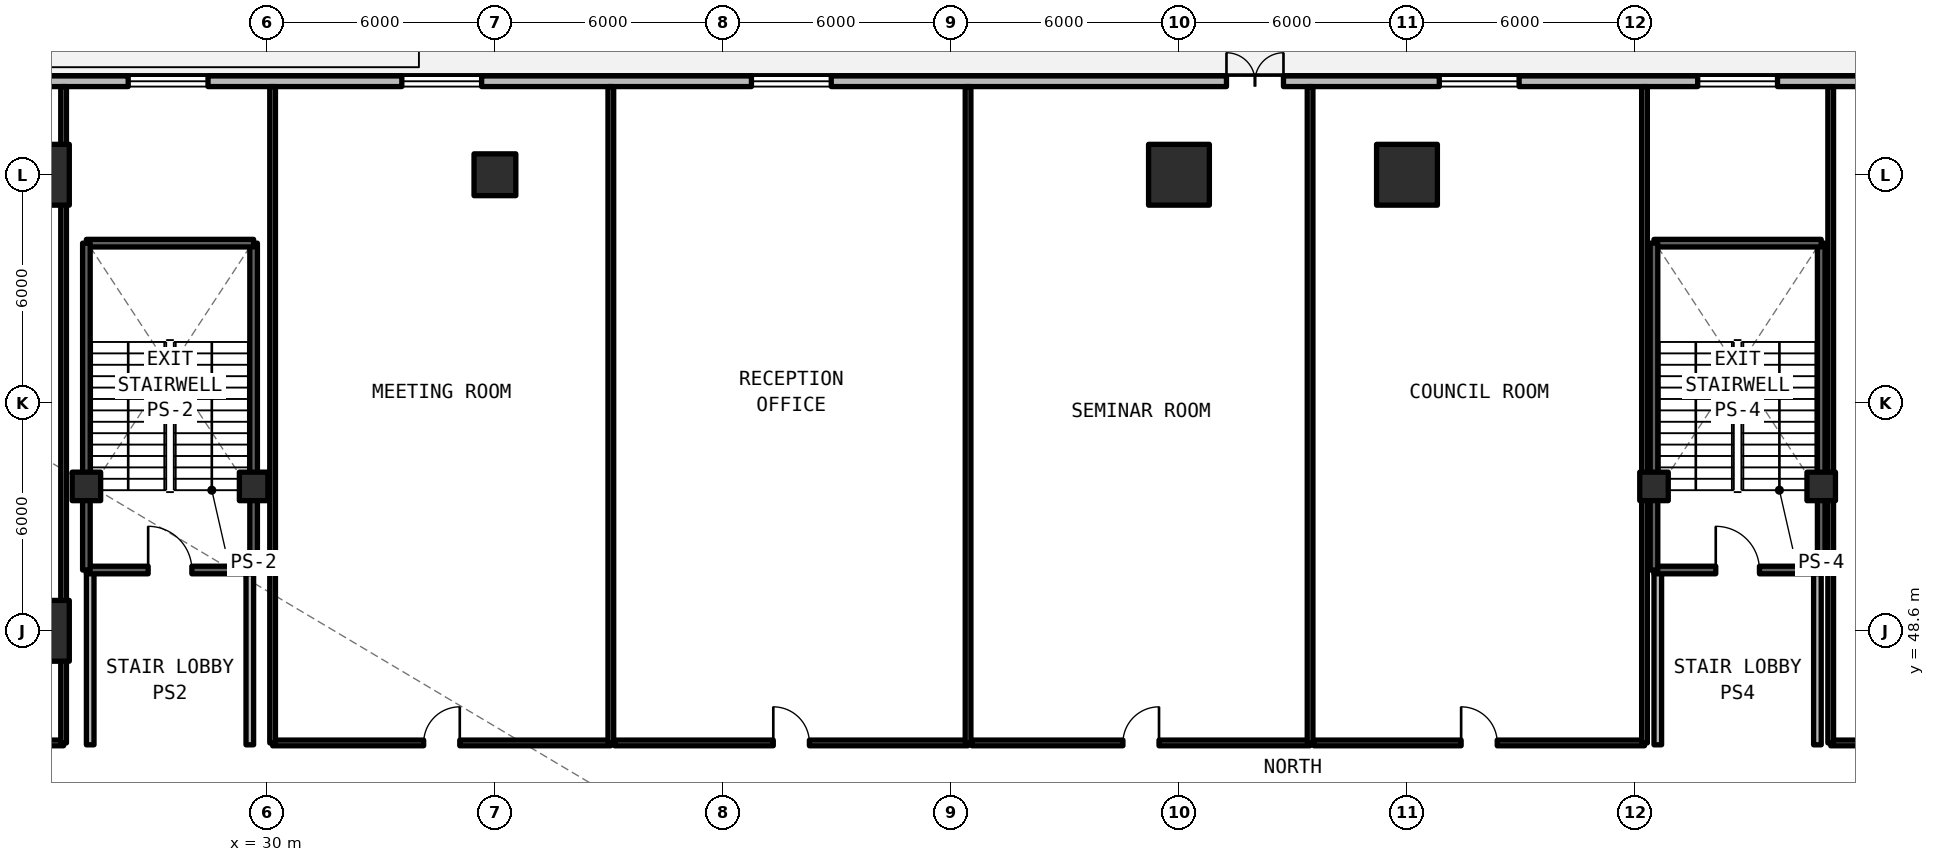
"""IFC4 building model, lengths in metres.
Left out: names, types, materials, properties, quantities, classifications, styles, units other than length and angle.
Written with IfcOpenShell. Run it as: python <this file> out.ifc"""

import sys

from ifc_helpers import new_model, si_unit, direction, frame, frame_2d, origin, origin_2d, place, context, subcontext, project, spatial, rectangle, circle, extrude, element, fill, save


model = new_model("IFC4")
c1 = context("Model", 3, precision=1e-05, world=origin(), true_north=direction((0.0, 1.0)))
c2 = subcontext(c1, "Body", "Model", "MODEL_VIEW")
j1 = project(units=[si_unit("LENGTHUNIT", "METRE"), si_unit("PLANEANGLEUNIT", "RADIAN")], contexts=[c1])
p1 = place(None, origin())
s1 = spatial("IfcSite", under=j1, at=p1, CompositionType="ELEMENT")
p2 = place(p1, origin())
s2 = spatial("IfcBuilding", under=s1, at=p2, CompositionType="ELEMENT")
p3 = place(p2, frame((0.0, 0.0, 19.47)))
s3 = spatial("IfcBuildingStorey", under=s2, at=p3, CompositionType="ELEMENT", Elevation=19.47)
p4 = place(p3, frame((24.0, 60.6, 0.0), z_axis=(0.0, 0.0, 1.0), x_axis=(1.0, 0.0, 0.0)))
e1 = element("IfcColumn", 1, at=p4, inside=s3, PredefinedType="COLUMN", context=c2, shape_type="SweptSolid", body=[
    extrude(rectangle(XDim=1.6, YDim=1.6, at=origin_2d()), origin(), (0.0, 0.0, 1.0), 4.62),
])
p5 = place(p3, frame((36.0, 60.6, 0.0), z_axis=(0.0, 0.0, 1.0), x_axis=(1.0, 0.0, 0.0)))
e2 = element("IfcColumn", 2, at=p5, inside=s3, PredefinedType="COLUMN", context=c2, shape_type="SweptSolid", body=[
    extrude(circle(Radius=0.55, at=origin_2d()), origin(), (0.0, 0.0, 1.0), 4.62),
])
for number, where, z_axis, x_axis in (
    (3, (54.0, 60.6, 0.0), (0.0, 0.0, 1.0), (1.0, 0.0, 0.0)),
    (4, (60.0, 60.6, 0.0), (0.0, 0.0, 1.0), (1.0, 0.0, 0.0)),
    (5, (24.0, 48.6, 0.0), (0.0, 0.0, 1.0), (1.0, 0.0, 0.0)),
):
    element("IfcColumn", number, at=place(p3, frame(where, z_axis=z_axis, x_axis=x_axis)), inside=s3, PredefinedType="COLUMN", context=c2, shape_type="SweptSolid", body=[
        extrude(rectangle(XDim=1.6, YDim=1.6, at=origin_2d()), origin(), (0.0, 0.0, 1.0), 4.62),
    ])
for number, where, z_axis, x_axis in (
    (6, (25.25, 52.4, 0.0), (0.0, 0.0, 1.0), (1.0, 0.0, 0.0)),
    (7, (29.65, 52.4, 0.0), (0.0, 0.0, 1.0), (1.0, 0.0, 0.0)),
    (8, (66.5, 52.4, 0.0), (0.0, 0.0, 1.0), (1.0, 0.0, 0.0)),
    (9, (70.9, 52.4, 0.0), (0.0, 0.0, 1.0), (1.0, 0.0, 0.0)),
):
    element("IfcColumn", number, at=place(p3, frame(where, z_axis=z_axis, x_axis=x_axis)), inside=s3, PredefinedType="COLUMN", context=c2, shape_type="SweptSolid", body=[
        extrude(rectangle(XDim=0.75, YDim=0.75, at=origin_2d()), origin(), (0.0, 0.0, 1.0), 4.27),
    ])
p6 = place(p3, frame((104.642, 63.06, 0.0), z_axis=(0.0, 0.0, 1.0), x_axis=(-1.0, 0.0, 0.0)))
e10 = element("IfcWall", 10, at=p6, inside=s3, PredefinedType="SOLIDWALL", context=c2, shape_type="SweptSolid", body=[
    extrude(rectangle(XDim=95.284, YDim=0.28, at=frame_2d((47.642, 0.0))), origin(), (0.0, 0.0, 1.0), 4.27),
])
p7 = place(p6, frame((47.892, 0.0, 0.0)))
e11 = element("IfcOpeningElement", 11, at=p7, cuts=e10, PredefinedType="OPENING", context=c2, shape_type="SweptSolid", body=[
    extrude(rectangle(XDim=1.5, YDim=2.2, at=frame_2d((0.75, 1.1))), frame((0.0, 0.15, 0.0), z_axis=(0.0, -1.0, 0.0), x_axis=(1.0, 0.0, 0.0)), (0.0, 0.0, 1.0), 0.3),
])
p8 = place(p6, frame((86.192, 0.0, 0.78)))
e12 = element("IfcOpeningElement", 12, at=p8, cuts=e10, PredefinedType="OPENING", context=c2, shape_type="SweptSolid", body=[
    extrude(rectangle(XDim=2.1, YDim=1.66, at=frame_2d((1.05, 0.83))), frame((0.0, 0.15, 0.0), z_axis=(0.0, -1.0, 0.0), x_axis=(1.0, 0.0, 0.0)), (0.0, 0.0, 1.0), 0.3),
])
p9 = place(p6, frame((68.992, 0.0, 0.78)))
e13 = element("IfcOpeningElement", 13, at=p9, cuts=e10, PredefinedType="OPENING", context=c2, shape_type="SweptSolid", body=[
    extrude(rectangle(XDim=2.1, YDim=1.66, at=frame_2d((1.05, 0.83))), frame((0.0, 0.15, 0.0), z_axis=(0.0, -1.0, 0.0), x_axis=(1.0, 0.0, 0.0)), (0.0, 0.0, 1.0), 0.3),
])
p10 = place(p6, frame((59.792, 0.0, 0.78)))
e14 = element("IfcOpeningElement", 14, at=p10, cuts=e10, PredefinedType="OPENING", context=c2, shape_type="SweptSolid", body=[
    extrude(rectangle(XDim=2.1, YDim=1.66, at=frame_2d((1.05, 0.83))), frame((0.0, 0.15, 0.0), z_axis=(0.0, -1.0, 0.0), x_axis=(1.0, 0.0, 0.0)), (0.0, 0.0, 1.0), 0.3),
])
p11 = place(p6, frame((41.692, 0.0, 0.78)))
e15 = element("IfcOpeningElement", 15, at=p11, cuts=e10, PredefinedType="OPENING", context=c2, shape_type="SweptSolid", body=[
    extrude(rectangle(XDim=2.1, YDim=1.66, at=frame_2d((1.05, 0.83))), frame((0.0, 0.15, 0.0), z_axis=(0.0, -1.0, 0.0), x_axis=(1.0, 0.0, 0.0)), (0.0, 0.0, 1.0), 0.3),
])
p12 = place(p6, frame((25.992, 0.0, 0.78)))
e16 = element("IfcOpeningElement", 16, at=p12, cuts=e10, PredefinedType="OPENING", context=c2, shape_type="SweptSolid", body=[
    extrude(rectangle(XDim=2.1, YDim=1.66, at=frame_2d((1.05, 0.83))), frame((0.0, 0.15, 0.0), z_axis=(0.0, -1.0, 0.0), x_axis=(1.0, 0.0, 0.0)), (0.0, 0.0, 1.0), 0.3),
])
p13 = place(p6, frame((7.192, 0.0, 0.78)))
e17 = element("IfcOpeningElement", 17, at=p13, cuts=e10, PredefinedType="OPENING", context=c2, shape_type="SweptSolid", body=[
    extrude(rectangle(XDim=2.1, YDim=1.66, at=frame_2d((1.05, 0.83))), frame((0.0, 0.15, 0.0), z_axis=(0.0, -1.0, 0.0), x_axis=(1.0, 0.0, 0.0)), (0.0, 0.0, 1.0), 0.3),
])
p14 = place(p6, frame((34.892, 0.0, 0.78)))
e18 = element("IfcOpeningElement", 18, at=p14, cuts=e10, PredefinedType="OPENING", context=c2, shape_type="SweptSolid", body=[
    extrude(rectangle(XDim=2.1, YDim=1.66, at=frame_2d((1.05, 0.83))), frame((0.0, 0.15, 0.0), z_axis=(0.0, -1.0, 0.0), x_axis=(1.0, 0.0, 0.0)), (0.0, 0.0, 1.0), 0.3),
])
p15 = place(p6, frame((76.192, 0.0, 0.78)))
e19 = element("IfcOpeningElement", 19, at=p15, cuts=e10, PredefinedType="OPENING", context=c2, shape_type="SweptSolid", body=[
    extrude(rectangle(XDim=2.1, YDim=1.66, at=frame_2d((1.05, 0.83))), frame((0.0, 0.15, 0.0), z_axis=(0.0, -1.0, 0.0), x_axis=(1.0, 0.0, 0.0)), (0.0, 0.0, 1.0), 0.3),
])
for number, where, z_axis, x_axis in (
    (20, (25.35, 45.6, 0.0), (0.0, 0.0, 1.0), (0.0, 1.0, 0.0)),
    (21, (29.55, 45.6, 0.0), (0.0, 0.0, 1.0), (0.0, 1.0, 0.0)),
    (22, (66.6, 45.6, 0.0), (0.0, 0.0, 1.0), (0.0, 1.0, 0.0)),
    (23, (70.8, 45.6, 0.0), (0.0, 0.0, 1.0), (0.0, 1.0, 0.0)),
):
    element("IfcWall", number, at=place(p3, frame(where, z_axis=z_axis, x_axis=x_axis)), inside=s3, PredefinedType="SOLIDWALL", context=c2, shape_type="SweptSolid", body=[
        extrude(rectangle(XDim=4.6, YDim=0.2, at=frame_2d((2.3, 0.0))), origin(), (0.0, 0.0, 1.0), 3.49),
    ])
p16 = place(p3, frame((10.15, 45.65, 0.0), z_axis=(0.0, 0.0, 1.0), x_axis=(1.0, 0.0, 0.0)))
e24 = element("IfcWall", 24, at=p16, inside=s3, PredefinedType="SOLIDWALL", context=c2, shape_type="SweptSolid", body=[
    extrude(rectangle(XDim=14.5, YDim=0.15, at=frame_2d((7.25, 0.0))), origin(), (0.0, 0.0, 1.0), 3.49),
])
p17 = place(p16, frame((6.775, 0.0, 0.0)))
e25 = element("IfcOpeningElement", 25, at=p17, cuts=e24, PredefinedType="OPENING", context=c2, shape_type="SweptSolid", body=[
    extrude(rectangle(XDim=0.95, YDim=2.15, at=frame_2d((0.475, 1.075))), frame((0.0, 0.085, 0.0), z_axis=(0.0, -1.0, 0.0), x_axis=(1.0, 0.0, 0.0)), (0.0, 0.0, 1.0), 0.17),
])
p18 = place(p3, frame((24.65, 45.65, 0.0), z_axis=(0.0, 0.0, 1.0), x_axis=(0.0, 1.0, 0.0)))
e26 = element("IfcWall", 26, at=p18, inside=s3, PredefinedType="SOLIDWALL", context=c2, shape_type="SweptSolid", body=[
    extrude(rectangle(XDim=17.27, YDim=0.15, at=frame_2d((8.635, 0.0))), origin(), (0.0, 0.0, 1.0), 3.49),
])
p19 = place(p3, frame((30.15, 45.65, 0.0), z_axis=(0.0, 0.0, 1.0), x_axis=(1.0, 0.0, 0.0)))
e27 = element("IfcWall", 27, at=p19, inside=s3, PredefinedType="SOLIDWALL", context=c2, shape_type="SweptSolid", body=[
    extrude(rectangle(XDim=8.9, YDim=0.15, at=frame_2d((4.45, 0.0))), origin(), (0.0, 0.0, 1.0), 3.49),
])
p20 = place(p19, frame((3.975, 0.0, 0.0)))
e28 = element("IfcOpeningElement", 28, at=p20, cuts=e27, PredefinedType="OPENING", context=c2, shape_type="SweptSolid", body=[
    extrude(rectangle(XDim=0.95, YDim=2.15, at=frame_2d((0.475, 1.075))), frame((0.0, 0.085, 0.0), z_axis=(0.0, -1.0, 0.0), x_axis=(1.0, 0.0, 0.0)), (0.0, 0.0, 1.0), 0.17),
])
for number, where, z_axis, x_axis in (
    (29, (30.15, 45.65, 0.0), (0.0, 0.0, 1.0), (0.0, 1.0, 0.0)),
    (30, (39.05, 45.65, 0.0), (0.0, 0.0, 1.0), (0.0, 1.0, 0.0)),
):
    element("IfcWall", number, at=place(p3, frame(where, z_axis=z_axis, x_axis=x_axis)), inside=s3, PredefinedType="SOLIDWALL", context=c2, shape_type="SweptSolid", body=[
        extrude(rectangle(XDim=17.27, YDim=0.15, at=frame_2d((8.635, 0.0))), origin(), (0.0, 0.0, 1.0), 3.49),
    ])
p21 = place(p3, frame((39.15, 45.65, 0.0), z_axis=(0.0, 0.0, 1.0), x_axis=(1.0, 0.0, 0.0)))
e31 = element("IfcWall", 31, at=p21, inside=s3, PredefinedType="SOLIDWALL", context=c2, shape_type="SweptSolid", body=[
    extrude(rectangle(XDim=9.3, YDim=0.15, at=frame_2d((4.65, 0.0))), origin(), (0.0, 0.0, 1.0), 3.49),
])
p22 = place(p21, frame((4.175, 0.0, 0.0)))
e32 = element("IfcOpeningElement", 32, at=p22, cuts=e31, PredefinedType="OPENING", context=c2, shape_type="SweptSolid", body=[
    extrude(rectangle(XDim=0.95, YDim=2.15, at=frame_2d((0.475, 1.075))), frame((0.0, 0.085, 0.0), z_axis=(0.0, -1.0, 0.0), x_axis=(1.0, 0.0, 0.0)), (0.0, 0.0, 1.0), 0.17),
])
p23 = place(p3, frame((48.45, 45.65, 0.0), z_axis=(0.0, 0.0, 1.0), x_axis=(0.0, 1.0, 0.0)))
e33 = element("IfcWall", 33, at=p23, inside=s3, PredefinedType="SOLIDWALL", context=c2, shape_type="SweptSolid", body=[
    extrude(rectangle(XDim=17.27, YDim=0.15, at=frame_2d((8.635, 0.0))), origin(), (0.0, 0.0, 1.0), 3.49),
])
p24 = place(p3, frame((48.55, 45.65, 0.0), z_axis=(0.0, 0.0, 1.0), x_axis=(1.0, 0.0, 0.0)))
e34 = element("IfcWall", 34, at=p24, inside=s3, PredefinedType="SOLIDWALL", context=c2, shape_type="SweptSolid", body=[
    extrude(rectangle(XDim=8.9, YDim=0.15, at=frame_2d((4.45, 0.0))), origin(), (0.0, 0.0, 1.0), 3.49),
])
p25 = place(p24, frame((3.975, 0.0, 0.0)))
e35 = element("IfcOpeningElement", 35, at=p25, cuts=e34, PredefinedType="OPENING", context=c2, shape_type="SweptSolid", body=[
    extrude(rectangle(XDim=0.95, YDim=2.15, at=frame_2d((0.475, 1.075))), frame((0.0, 0.085, 0.0), z_axis=(0.0, -1.0, 0.0), x_axis=(1.0, 0.0, 0.0)), (0.0, 0.0, 1.0), 0.17),
])
p26 = place(p3, frame((57.45, 45.65, 0.0), z_axis=(0.0, 0.0, 1.0), x_axis=(0.0, 1.0, 0.0)))
e36 = element("IfcWall", 36, at=p26, inside=s3, PredefinedType="SOLIDWALL", context=c2, shape_type="SweptSolid", body=[
    extrude(rectangle(XDim=17.27, YDim=0.15, at=frame_2d((8.635, 0.0))), origin(), (0.0, 0.0, 1.0), 3.49),
])
p27 = place(p3, frame((57.55, 45.65, 0.0), z_axis=(0.0, 0.0, 1.0), x_axis=(1.0, 0.0, 0.0)))
e37 = element("IfcWall", 37, at=p27, inside=s3, PredefinedType="SOLIDWALL", context=c2, shape_type="SweptSolid", body=[
    extrude(rectangle(XDim=8.7, YDim=0.15, at=frame_2d((4.35, 0.0))), origin(), (0.0, 0.0, 1.0), 3.49),
])
p28 = place(p27, frame((3.875, 0.0, 0.0)))
e38 = element("IfcOpeningElement", 38, at=p28, cuts=e37, PredefinedType="OPENING", context=c2, shape_type="SweptSolid", body=[
    extrude(rectangle(XDim=0.95, YDim=2.15, at=frame_2d((0.475, 1.075))), frame((0.0, 0.085, 0.0), z_axis=(0.0, -1.0, 0.0), x_axis=(1.0, 0.0, 0.0)), (0.0, 0.0, 1.0), 0.17),
])
p29 = place(p3, frame((66.25, 45.65, 0.0), z_axis=(0.0, 0.0, 1.0), x_axis=(0.0, 1.0, 0.0)))
e39 = element("IfcWall", 39, at=p29, inside=s3, PredefinedType="SOLIDWALL", context=c2, shape_type="SweptSolid", body=[
    extrude(rectangle(XDim=17.27, YDim=0.15, at=frame_2d((8.635, 0.0))), origin(), (0.0, 0.0, 1.0), 3.49),
])
p30 = place(p3, frame((71.15, 45.65, 0.0), z_axis=(0.0, 0.0, 1.0), x_axis=(1.0, 0.0, 0.0)))
e40 = element("IfcWall", 40, at=p30, inside=s3, PredefinedType="SOLIDWALL", context=c2, shape_type="SweptSolid", body=[
    extrude(rectangle(XDim=12.9, YDim=0.15, at=frame_2d((6.45, 0.0))), origin(), (0.0, 0.0, 1.0), 3.49),
])
p31 = place(p30, frame((5.975, 0.0, 0.0)))
e41 = element("IfcOpeningElement", 41, at=p31, cuts=e40, PredefinedType="OPENING", context=c2, shape_type="SweptSolid", body=[
    extrude(rectangle(XDim=0.95, YDim=2.15, at=frame_2d((0.475, 1.075))), frame((0.0, 0.085, 0.0), z_axis=(0.0, -1.0, 0.0), x_axis=(1.0, 0.0, 0.0)), (0.0, 0.0, 1.0), 0.17),
])
p32 = place(p3, frame((71.15, 45.65, 0.0), z_axis=(0.0, 0.0, 1.0), x_axis=(0.0, 1.0, 0.0)))
e42 = element("IfcWall", 42, at=p32, inside=s3, PredefinedType="SOLIDWALL", context=c2, shape_type="SweptSolid", body=[
    extrude(rectangle(XDim=17.27, YDim=0.15, at=frame_2d((8.635, 0.0))), origin(), (0.0, 0.0, 1.0), 3.49),
])
p33 = place(p3, frame((25.25, 50.2, 0.0), z_axis=(0.0, 0.0, 1.0), x_axis=(1.0, 0.0, 0.0)))
e43 = element("IfcWall", 43, at=p33, inside=s3, PredefinedType="SOLIDWALL", context=c2, shape_type="SweptSolid", body=[
    extrude(rectangle(XDim=4.4, YDim=0.2, at=frame_2d((2.2, 0.0))), origin(), (0.0, 0.0, 1.0), 4.62),
])
p34 = place(p33, frame((1.625, 0.0, 0.0)))
e44 = element("IfcOpeningElement", 44, at=p34, cuts=e43, PredefinedType="OPENING", context=c2, shape_type="SweptSolid", body=[
    extrude(rectangle(XDim=1.15, YDim=2.15, at=frame_2d((0.575, 1.075))), frame((0.0, 0.11, 0.0), z_axis=(0.0, -1.0, 0.0), x_axis=(1.0, 0.0, 0.0)), (0.0, 0.0, 1.0), 0.22),
])
p35 = place(p3, frame((29.65, 50.2, 0.0), z_axis=(0.0, 0.0, 1.0), x_axis=(0.0, 1.0, 0.0)))
e45 = element("IfcWall", 45, at=p35, inside=s3, PredefinedType="SOLIDWALL", context=c2, shape_type="SweptSolid", body=[
    extrude(rectangle(XDim=8.6, YDim=0.2, at=frame_2d((4.3, 0.0))), origin(), (0.0, 0.0, 1.0), 4.62),
])
p36 = place(p3, frame((29.65, 58.8, 0.0), z_axis=(0.0, 0.0, 1.0), x_axis=(-1.0, 0.0, 0.0)))
e46 = element("IfcWall", 46, at=p36, inside=s3, PredefinedType="SOLIDWALL", context=c2, shape_type="SweptSolid", body=[
    extrude(rectangle(XDim=4.4, YDim=0.2, at=frame_2d((2.2, 0.0))), origin(), (0.0, 0.0, 1.0), 4.62),
])
p37 = place(p3, frame((25.25, 58.8, 0.0), z_axis=(0.0, 0.0, 1.0), x_axis=(0.0, -1.0, 0.0)))
e47 = element("IfcWall", 47, at=p37, inside=s3, PredefinedType="SOLIDWALL", context=c2, shape_type="SweptSolid", body=[
    extrude(rectangle(XDim=8.6, YDim=0.2, at=frame_2d((4.3, 0.0))), origin(), (0.0, 0.0, 1.0), 4.62),
])
p38 = place(p3, frame((66.5, 50.2, 0.0), z_axis=(0.0, 0.0, 1.0), x_axis=(1.0, 0.0, 0.0)))
e48 = element("IfcWall", 48, at=p38, inside=s3, PredefinedType="SOLIDWALL", context=c2, shape_type="SweptSolid", body=[
    extrude(rectangle(XDim=4.4, YDim=0.2, at=frame_2d((2.2, 0.0))), origin(), (0.0, 0.0, 1.0), 4.62),
])
p39 = place(p38, frame((1.625, 0.0, 0.0)))
e49 = element("IfcOpeningElement", 49, at=p39, cuts=e48, PredefinedType="OPENING", context=c2, shape_type="SweptSolid", body=[
    extrude(rectangle(XDim=1.15, YDim=2.15, at=frame_2d((0.575, 1.075))), frame((0.0, 0.11, 0.0), z_axis=(0.0, -1.0, 0.0), x_axis=(1.0, 0.0, 0.0)), (0.0, 0.0, 1.0), 0.22),
])
p40 = place(p3, frame((70.9, 50.2, 0.0), z_axis=(0.0, 0.0, 1.0), x_axis=(0.0, 1.0, 0.0)))
e50 = element("IfcWall", 50, at=p40, inside=s3, PredefinedType="SOLIDWALL", context=c2, shape_type="SweptSolid", body=[
    extrude(rectangle(XDim=8.6, YDim=0.2, at=frame_2d((4.3, 0.0))), origin(), (0.0, 0.0, 1.0), 4.62),
])
p41 = place(p3, frame((70.9, 58.8, 0.0), z_axis=(0.0, 0.0, 1.0), x_axis=(-1.0, 0.0, 0.0)))
e51 = element("IfcWall", 51, at=p41, inside=s3, PredefinedType="SOLIDWALL", context=c2, shape_type="SweptSolid", body=[
    extrude(rectangle(XDim=4.4, YDim=0.2, at=frame_2d((2.2, 0.0))), origin(), (0.0, 0.0, 1.0), 4.62),
])
p42 = place(p3, frame((66.5, 58.8, 0.0), z_axis=(0.0, 0.0, 1.0), x_axis=(0.0, -1.0, 0.0)))
e52 = element("IfcWall", 52, at=p42, inside=s3, PredefinedType="SOLIDWALL", context=c2, shape_type="SweptSolid", body=[
    extrude(rectangle(XDim=8.6, YDim=0.2, at=frame_2d((4.3, 0.0))), origin(), (0.0, 0.0, 1.0), 4.62),
])
p43 = place(p7, frame((1.5, 0.0, 0.0), z_axis=(0.0, 0.0, 1.0), x_axis=(-1.0, 0.0, 0.0)))
e53 = element("IfcDoor", 53, at=p43, inside=s3, OperationType="SINGLE_SWING_LEFT", PredefinedType="DOOR", context=c2, shape_type="SweptSolid", body=[
    extrude(rectangle(XDim=1.5, YDim=2.2, at=frame_2d((0.75, 1.1))), frame((0.0, 0.025, 0.0), z_axis=(0.0, -1.0, 0.0), x_axis=(1.0, 0.0, 0.0)), (0.0, 0.0, 1.0), 0.05),
])
fill(e11, e53)
p44 = place(p9, origin())
e54 = element("IfcWindow", 54, at=p44, inside=s3, PartitioningType="SINGLE_PANEL", PredefinedType="WINDOW", context=c2, shape_type="SweptSolid", body=[
    extrude(rectangle(XDim=2.1, YDim=1.66, at=frame_2d((1.05, 0.83))), frame((0.0, 0.03, 0.0), z_axis=(0.0, -1.0, 0.0), x_axis=(1.0, 0.0, 0.0)), (0.0, 0.0, 1.0), 0.06),
])
fill(e13, e54)
p45 = place(p10, origin())
e55 = element("IfcWindow", 55, at=p45, inside=s3, PartitioningType="SINGLE_PANEL", PredefinedType="WINDOW", context=c2, shape_type="SweptSolid", body=[
    extrude(rectangle(XDim=2.1, YDim=1.66, at=frame_2d((1.05, 0.83))), frame((0.0, 0.03, 0.0), z_axis=(0.0, -1.0, 0.0), x_axis=(1.0, 0.0, 0.0)), (0.0, 0.0, 1.0), 0.06),
])
fill(e14, e55)
p46 = place(p11, origin())
e56 = element("IfcWindow", 56, at=p46, inside=s3, PartitioningType="SINGLE_PANEL", PredefinedType="WINDOW", context=c2, shape_type="SweptSolid", body=[
    extrude(rectangle(XDim=2.1, YDim=1.66, at=frame_2d((1.05, 0.83))), frame((0.0, 0.03, 0.0), z_axis=(0.0, -1.0, 0.0), x_axis=(1.0, 0.0, 0.0)), (0.0, 0.0, 1.0), 0.06),
])
fill(e15, e56)
p47 = place(p14, origin())
e57 = element("IfcWindow", 57, at=p47, inside=s3, PartitioningType="SINGLE_PANEL", PredefinedType="WINDOW", context=c2, shape_type="SweptSolid", body=[
    extrude(rectangle(XDim=2.1, YDim=1.66, at=frame_2d((1.05, 0.83))), frame((0.0, 0.03, 0.0), z_axis=(0.0, -1.0, 0.0), x_axis=(1.0, 0.0, 0.0)), (0.0, 0.0, 1.0), 0.06),
])
fill(e18, e57)
p48 = place(p15, origin())
e58 = element("IfcWindow", 58, at=p48, inside=s3, PartitioningType="SINGLE_PANEL", PredefinedType="WINDOW", context=c2, shape_type="SweptSolid", body=[
    extrude(rectangle(XDim=2.1, YDim=1.66, at=frame_2d((1.05, 0.83))), frame((0.0, 0.03, 0.0), z_axis=(0.0, -1.0, 0.0), x_axis=(1.0, 0.0, 0.0)), (0.0, 0.0, 1.0), 0.06),
])
fill(e19, e58)
p49 = place(p20, origin())
e59 = element("IfcDoor", 59, at=p49, inside=s3, OperationType="SINGLE_SWING_RIGHT", PredefinedType="DOOR", context=c2, shape_type="SweptSolid", body=[
    extrude(rectangle(XDim=0.95, YDim=2.15, at=frame_2d((0.475, 1.075))), frame((0.0, 0.025, 0.0), z_axis=(0.0, -1.0, 0.0), x_axis=(1.0, 0.0, 0.0)), (0.0, 0.0, 1.0), 0.05),
])
fill(e28, e59)
p50 = place(p22, origin())
e60 = element("IfcDoor", 60, at=p50, inside=s3, OperationType="SINGLE_SWING_LEFT", PredefinedType="DOOR", context=c2, shape_type="SweptSolid", body=[
    extrude(rectangle(XDim=0.95, YDim=2.15, at=frame_2d((0.475, 1.075))), frame((0.0, 0.025, 0.0), z_axis=(0.0, -1.0, 0.0), x_axis=(1.0, 0.0, 0.0)), (0.0, 0.0, 1.0), 0.05),
])
fill(e32, e60)
p51 = place(p25, origin())
e61 = element("IfcDoor", 61, at=p51, inside=s3, OperationType="SINGLE_SWING_RIGHT", PredefinedType="DOOR", context=c2, shape_type="SweptSolid", body=[
    extrude(rectangle(XDim=0.95, YDim=2.15, at=frame_2d((0.475, 1.075))), frame((0.0, 0.025, 0.0), z_axis=(0.0, -1.0, 0.0), x_axis=(1.0, 0.0, 0.0)), (0.0, 0.0, 1.0), 0.05),
])
fill(e35, e61)
p52 = place(p28, origin())
e62 = element("IfcDoor", 62, at=p52, inside=s3, OperationType="SINGLE_SWING_LEFT", PredefinedType="DOOR", context=c2, shape_type="SweptSolid", body=[
    extrude(rectangle(XDim=0.95, YDim=2.15, at=frame_2d((0.475, 1.075))), frame((0.0, 0.025, 0.0), z_axis=(0.0, -1.0, 0.0), x_axis=(1.0, 0.0, 0.0)), (0.0, 0.0, 1.0), 0.05),
])
fill(e38, e62)
p53 = place(p34, origin())
e63 = element("IfcDoor", 63, at=p53, inside=s3, OperationType="SINGLE_SWING_LEFT", PredefinedType="DOOR", context=c2, shape_type="SweptSolid", body=[
    extrude(rectangle(XDim=1.15, YDim=2.15, at=frame_2d((0.575, 1.075))), frame((0.0, 0.025, 0.0), z_axis=(0.0, -1.0, 0.0), x_axis=(1.0, 0.0, 0.0)), (0.0, 0.0, 1.0), 0.05),
])
fill(e44, e63)
p54 = place(p39, origin())
e64 = element("IfcDoor", 64, at=p54, inside=s3, OperationType="SINGLE_SWING_LEFT", PredefinedType="DOOR", context=c2, shape_type="SweptSolid", body=[
    extrude(rectangle(XDim=1.15, YDim=2.15, at=frame_2d((0.575, 1.075))), frame((0.0, 0.025, 0.0), z_axis=(0.0, -1.0, 0.0), x_axis=(1.0, 0.0, 0.0)), (0.0, 0.0, 1.0), 0.05),
])
fill(e49, e64)
save(model, sys.argv[1])
